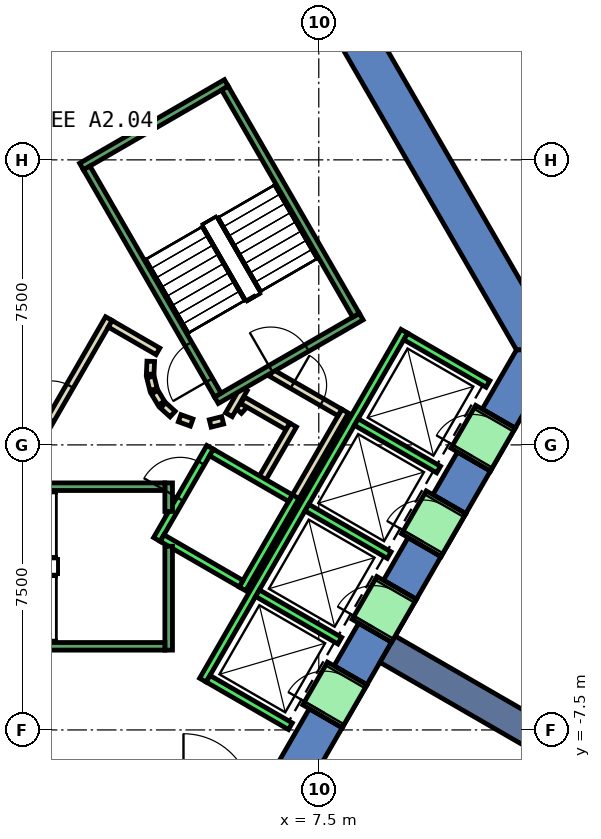
"""IFC4 building model, lengths in metres.
Left out: names, types, materials, properties, quantities, classifications, styles, units other than length and angle.
Written with IfcOpenShell. Run it as: python <this file> out.ifc"""

import sys

from ifc_helpers import new_model, si_unit, direction, frame, frame_2d, origin, place, context, subcontext, project, spatial, polyline, rectangle, outline, extrude, element, fill, save


model = new_model("IFC4")
c1 = context("Model", 3, precision=1e-05, world=origin(), true_north=direction((0.0, 1.0)))
c2 = subcontext(c1, "Body", "Model", "MODEL_VIEW")
j1 = project(units=[si_unit("LENGTHUNIT", "METRE"), si_unit("PLANEANGLEUNIT", "RADIAN")], contexts=[c1])
p1 = place(None, origin())
s1 = spatial("IfcSite", under=j1, at=p1, CompositionType="ELEMENT")
p2 = place(p1, origin())
s2 = spatial("IfcBuilding", under=s1, at=p2, CompositionType="ELEMENT")
p3 = place(p2, origin())
s3 = spatial("IfcBuildingStorey", under=s2, at=p3, CompositionType="ELEMENT", Elevation=0.0)
p4 = place(p3, frame((0.0, 0.0, -0.5)))
e1 = element("IfcWall", 1, at=p4, inside=s3, PredefinedType="SHEAR", context=c2, shape_type="SweptSolid", body=[
    extrude(outline(polyline([(8.517, 11.748), (7.651, 11.248), (12.702, 2.5), (13.856, 2.5), (8.517, 11.748)])), origin(), (0.0, 0.0, 1.0), 9.05),
])
p5 = place(p3, frame((0.0, 0.0, -0.5)))
e2 = element("IfcWall", 2, at=p5, inside=s3, PredefinedType="SHEAR", context=c2, shape_type="SweptSolid", body=[
    extrude(outline(polyline([(8.117, -7.44), (7.252, -6.94), (6.351, -8.5), (6.928, -9.5), (8.117, -7.44)])), origin(), (0.0, 0.0, 1.0), 9.05),
])
p6 = place(p3, frame((0.0, 0.0, -0.5)))
e3 = element("IfcWall", 3, at=p6, inside=s3, PredefinedType="SHEAR", context=c2, shape_type="SweptSolid", body=[
    extrude(outline(polyline([(9.417, -5.189), (8.551, -4.689), (7.902, -5.814), (8.767, -6.314), (9.417, -5.189)])), origin(), (0.0, 0.0, 1.0), 9.05),
])
p7 = place(p3, frame((0.0, 0.0, -0.5)))
e4 = element("IfcWall", 4, at=p7, inside=s3, PredefinedType="SHEAR", context=c2, shape_type="SweptSolid", body=[
    extrude(outline(polyline([(10.717, -2.937), (9.851, -2.437), (9.201, -3.563), (10.067, -4.063), (10.717, -2.937)])), origin(), (0.0, 0.0, 1.0), 9.05),
])
p8 = place(p3, frame((0.0, 0.0, -0.5)))
e5 = element("IfcWall", 5, at=p8, inside=s3, PredefinedType="SHEAR", context=c2, shape_type="SweptSolid", body=[
    extrude(outline(polyline([(12.017, -0.686), (11.151, -0.186), (10.501, -1.311), (11.367, -1.811), (12.017, -0.686)])), origin(), (0.0, 0.0, 1.0), 9.05),
])
p9 = place(p3, frame((0.0, 0.0, -0.5)))
e6 = element("IfcWall", 6, at=p9, inside=s3, PredefinedType="SHEAR", context=c2, shape_type="SweptSolid", body=[
    extrude(outline(polyline([(11.801, 0.94), (12.667, 0.44), (13.856, 2.5), (12.702, 2.5), (11.801, 0.94)])), origin(), (0.0, 0.0, 1.0), 9.05),
])
p10 = place(p3, frame((0.0, 0.0, 3.6)))
e7 = element("IfcWall", 7, at=p10, inside=s3, PredefinedType="SHEAR", context=c2, shape_type="SweptSolid", body=[
    extrude(outline(polyline([(8.767, -6.314), (7.902, -5.814), (7.252, -6.94), (8.117, -7.44), (8.767, -6.314)])), origin(), (0.0, 0.0, 1.0), 4.95),
])
p11 = place(p3, frame((0.0, 0.0, 3.6)))
e8 = element("IfcWall", 8, at=p11, inside=s3, PredefinedType="SHEAR", context=c2, shape_type="SweptSolid", body=[
    extrude(outline(polyline([(10.067, -4.063), (9.201, -3.563), (8.551, -4.689), (9.417, -5.189), (10.067, -4.063)])), origin(), (0.0, 0.0, 1.0), 4.95),
])
p12 = place(p3, frame((0.0, 0.0, 3.6)))
e9 = element("IfcWall", 9, at=p12, inside=s3, PredefinedType="SHEAR", context=c2, shape_type="SweptSolid", body=[
    extrude(outline(polyline([(11.367, -1.811), (10.501, -1.311), (9.851, -2.437), (10.717, -2.937), (11.367, -1.811)])), origin(), (0.0, 0.0, 1.0), 4.95),
])
p13 = place(p3, frame((0.0, 0.0, 3.6)))
e10 = element("IfcWall", 10, at=p13, inside=s3, PredefinedType="SHEAR", context=c2, shape_type="SweptSolid", body=[
    extrude(outline(polyline([(12.667, 0.44), (11.801, 0.94), (11.151, -0.186), (12.017, -0.686), (12.667, 0.44)])), origin(), (0.0, 0.0, 1.0), 4.95),
])
p14 = place(p3, frame((9.31, -5.375, -0.5), z_axis=(0.0, 0.0, 1.0), x_axis=(0.866017533419, -0.500013631625, 0.0)))
e11 = element("IfcWall", 11, at=p14, inside=s3, PredefinedType="SHEAR", context=c2, shape_type="SweptSolid", body=[
    extrude(rectangle(XDim=9.0, YDim=0.8, at=frame_2d((4.5, 0.0))), origin(), (0.0, 0.0, 1.0), 9.05),
])
p15 = place(p3, frame((5.39, 0.898, 0.0), z_axis=(0.0, 0.0, 1.0), x_axis=(0.673828488714, 0.738887791073, 0.0)))
e12 = element("IfcWall", 12, at=p15, inside=s3, PredefinedType="PARTITIONING", context=c2, shape_type="SweptSolid", body=[
    extrude(rectangle(XDim=0.263, YDim=0.2, at=frame_2d((0.131, 0.0))), origin(), (0.0, 0.0, 1.0), 8.55),
])
p16 = place(p3, frame((5.499, 1.172, 0.0), z_axis=(0.0, 0.0, 1.0), x_axis=(0.866333505267, -0.499465972466, 0.0)))
e13 = element("IfcWall", 13, at=p16, inside=s3, PredefinedType="PARTITIONING", context=c2, shape_type="SweptSolid", body=[
    extrude(rectangle(XDim=1.374, YDim=0.2, at=frame_2d((0.687, 0.0))), origin(), (0.0, 0.0, 1.0), 8.55),
])
p17 = place(p3, frame((6.826, 0.522, 0.0), z_axis=(0.0, 0.0, 1.0), x_axis=(-0.500016722714, -0.866015748706, 0.0)))
e14 = element("IfcWall", 14, at=p17, inside=s3, PredefinedType="PARTITIONING", context=c2, shape_type="SweptSolid", body=[
    extrude(rectangle(XDim=1.7, YDim=0.2, at=frame_2d((0.85, 0.0))), origin(), (0.0, 0.0, 1.0), 8.55),
])
p18 = place(p3, frame((8.192, 0.888, 0.0), z_axis=(0.0, 0.0, 1.0), x_axis=(-0.499940625693, -0.866059680843, 0.0)))
e15 = element("IfcWall", 15, at=p18, inside=s3, PredefinedType="PARTITIONING", context=c2, shape_type="SweptSolid", body=[
    extrude(rectangle(XDim=2.68, YDim=0.2, at=frame_2d((1.34, 0.0))), origin(), (0.0, 0.0, 1.0), 8.55),
])
p19 = place(p3, frame((5.135, 0.793, 0.0), z_axis=(0.0, 0.0, 1.0), x_axis=(0.499526442893, 0.866298639529, 0.0)))
e16 = element("IfcWall", 16, at=p19, inside=s3, PredefinedType="PARTITIONING", context=c2, shape_type="SweptSolid", body=[
    extrude(rectangle(XDim=0.791, YDim=0.2, at=frame_2d((0.396, 0.0))), origin(), (0.0, 0.0, 1.0), 8.55),
])
p20 = place(p3, frame((6.25, 1.894, 0.0), z_axis=(0.0, 0.0, 1.0), x_axis=(0.866043184279, -0.499969202016, 0.0)))
e17 = element("IfcWall", 17, at=p20, inside=s3, PredefinedType="PARTITIONING", context=c2, shape_type="SweptSolid", body=[
    extrude(rectangle(XDim=2.084, YDim=0.2, at=frame_2d((1.042, 0.0))), origin(), (0.0, 0.0, 1.0), 8.55),
])
p21 = place(p20, frame((0.642, 0.0, 0.0)))
e18 = element("IfcOpeningElement", 18, at=p21, cuts=e17, PredefinedType="OPENING", context=c2, shape_type="SweptSolid", body=[
    extrude(rectangle(XDim=0.9, YDim=2.1, at=frame_2d((0.45, 1.05))), frame((0.0, 0.11, 0.0), z_axis=(0.0, -1.0, 0.0), x_axis=(1.0, 0.0, 0.0)), (0.0, 0.0, 1.0), 0.22),
])
p22 = place(p3, frame((3.079, 2.199, 0.0), z_axis=(0.0, 0.0, 1.0), x_axis=(-0.047771483479, -0.998858290933, 0.0)))
e19 = element("IfcWall", 19, at=p22, inside=s3, PredefinedType="PARTITIONING", context=c2, shape_type="SweptSolid", body=[
    extrude(rectangle(XDim=0.337, YDim=0.2, at=frame_2d((0.169, 0.0))), origin(), (0.0, 0.0, 1.0), 8.55),
])
p23 = place(p3, frame((3.07, 1.786, 0.0), z_axis=(0.0, 0.0, 1.0), x_axis=(0.242705583207, -0.970099994784, 0.0)))
e20 = element("IfcWall", 20, at=p23, inside=s3, PredefinedType="PARTITIONING", context=c2, shape_type="SweptSolid", body=[
    extrude(rectangle(XDim=0.338, YDim=0.2, at=frame_2d((0.169, 0.0))), origin(), (0.0, 0.0, 1.0), 8.55),
])
for number, where, z_axis, x_axis in (
    (21, (3.182, 1.388, 0.0), (0.0, 0.0, 1.0), (0.512, -0.859, 0.0)),
    (22, (3.404, 1.039, 0.0), (0.0, 0.0, 1.0), (0.74, -0.672, 0.0)),
):
    element("IfcWall", number, at=place(p3, frame(where, z_axis=z_axis, x_axis=x_axis)), inside=s3, PredefinedType="PARTITIONING", context=c2, shape_type="SweptSolid", body=[
        extrude(rectangle(XDim=0.338, YDim=0.2, at=frame_2d((0.169, 0.0))), origin(), (0.0, 0.0, 1.0), 8.55),
    ])
p24 = place(p3, frame((3.838, 0.702, 0.0), z_axis=(0.0, 0.0, 1.0), x_axis=(0.941035081519, -0.338308993895, 0.0)))
e23 = element("IfcWall", 23, at=p24, inside=s3, PredefinedType="PARTITIONING", context=c2, shape_type="SweptSolid", body=[
    extrude(rectangle(XDim=0.337, YDim=0.2, at=frame_2d((0.168, 0.0))), origin(), (0.0, 0.0, 1.0), 8.55),
])
p25 = place(p3, frame((4.644, 0.564, 0.0), z_axis=(0.0, 0.0, 1.0), x_axis=(0.969929076366, 0.243387729394, 0.0)))
e24 = element("IfcWall", 24, at=p25, inside=s3, PredefinedType="PARTITIONING", context=c2, shape_type="SweptSolid", body=[
    extrude(rectangle(XDim=0.337, YDim=0.2, at=frame_2d((0.168, 0.0))), origin(), (0.0, 0.0, 1.0), 8.55),
])
p26 = place(p3, frame((-0.52, -1.0, 0.0), z_axis=(0.0, 0.0, 1.0), x_axis=(0.50011622646, 0.865958290007, 0.0)))
e25 = element("IfcWall", 25, at=p26, inside=s3, PredefinedType="PARTITIONING", context=c2, shape_type="SweptSolid", body=[
    extrude(rectangle(XDim=4.991, YDim=0.2, at=frame_2d((2.496, 0.0))), origin(), (0.0, 0.0, 1.0), 8.55),
])
p27 = place(p26, frame((1.945, 0.0, 0.0)))
e26 = element("IfcOpeningElement", 26, at=p27, cuts=e25, PredefinedType="OPENING", context=c2, shape_type="SweptSolid", body=[
    extrude(rectangle(XDim=1.0, YDim=2.1, at=frame_2d((0.5, 1.05))), frame((0.0, 0.11, 0.0), z_axis=(0.0, -1.0, 0.0), x_axis=(1.0, 0.0, 0.0)), (0.0, 0.0, 1.0), 0.22),
])
p28 = place(p3, frame((2.012, 3.186, 0.0), z_axis=(0.0, 0.0, 1.0), x_axis=(0.865891012941, -0.500232699559, 0.0)))
e27 = element("IfcWall", 27, at=p28, inside=s3, PredefinedType="PARTITIONING", context=c2, shape_type="SweptSolid", body=[
    extrude(rectangle(XDim=1.449, YDim=0.2, at=frame_2d((0.725, 0.0))), origin(), (0.0, 0.0, 1.0), 8.55),
])
p29 = place(p3, frame((3.24, -2.488, 0.0), z_axis=(0.0, 0.0, 1.0), x_axis=(0.49994636267, 0.866056369097, 0.0)))
e28 = element("IfcWall", 28, at=p29, inside=s3, PredefinedType="STANDARD", context=c2, shape_type="SweptSolid", body=[
    extrude(rectangle(XDim=2.8, YDim=0.2, at=frame_2d((1.4, 0.0))), origin(), (0.0, 0.0, 1.0), 8.55),
])
p30 = place(p29, frame((1.225, 0.0, 0.0)))
e29 = element("IfcOpeningElement", 29, at=p30, cuts=e28, PredefinedType="OPENING", context=c2, shape_type="SweptSolid", body=[
    extrude(rectangle(XDim=1.1, YDim=2.1, at=frame_2d((0.55, 1.05))), frame((0.0, 0.11, 0.0), z_axis=(0.0, -1.0, 0.0), x_axis=(1.0, 0.0, 0.0)), (0.0, 0.0, 1.0), 0.22),
])
p31 = place(p3, frame((5.492, -3.788, 0.0), z_axis=(0.0, 0.0, 1.0), x_axis=(0.500011755427, 0.866018616679, 0.0)))
e30 = element("IfcWall", 30, at=p31, inside=s3, PredefinedType="STANDARD", context=c2, shape_type="SweptSolid", body=[
    extrude(rectangle(XDim=2.8, YDim=0.2, at=frame_2d((1.4, 0.0))), origin(), (0.0, 0.0, 1.0), 8.55),
])
p32 = place(p3, frame((3.377, -2.452, 0.0), z_axis=(0.0, 0.0, 1.0), x_axis=(0.865955154139, -0.50012165622, 0.0)))
e31 = element("IfcWall", 31, at=p32, inside=s3, PredefinedType="STANDARD", context=c2, shape_type="SweptSolid", body=[
    extrude(rectangle(XDim=2.4, YDim=0.2, at=frame_2d((1.2, 0.0))), origin(), (0.0, 0.0, 1.0), 8.55),
])
p33 = place(p3, frame((4.677, -0.2, 0.0), z_axis=(0.0, 0.0, 1.0), x_axis=(0.865973769406, -0.500089422704, 0.0)))
e32 = element("IfcWall", 32, at=p33, inside=s3, PredefinedType="STANDARD", context=c2, shape_type="SweptSolid", body=[
    extrude(rectangle(XDim=2.399, YDim=0.2, at=frame_2d((1.2, 0.0))), origin(), (0.0, 0.0, 1.0), 8.55),
])
p34 = place(p3, frame((4.451, -6.19, 0.0), z_axis=(0.0, 0.0, 1.0), x_axis=(0.50000090737, 0.866024879913, 0.0)))
e33 = element("IfcWall", 33, at=p34, inside=s3, PredefinedType="STANDARD", context=c2, shape_type="SweptSolid", body=[
    extrude(rectangle(XDim=10.6, YDim=0.2, at=frame_2d((5.3, 0.0))), origin(), (0.0, 0.0, 1.0), 8.55),
])
for number, where, z_axis, x_axis in (
    (34, (4.588, -6.153, 0.0), (0.0, 0.0, 1.0), (0.866, -0.5, 0.0)),
    (35, (5.888, -3.902, 0.0), (0.0, 0.0, 1.0), (0.866, -0.5, 0.0)),
    (36, (7.188, -1.65, 0.0), (0.0, 0.0, 1.0), (0.866, -0.5, 0.0)),
    (37, (8.488, 0.602, 0.0), (0.0, 0.0, 1.0), (0.866, -0.5, 0.0)),
):
    element("IfcWall", number, at=place(p3, frame(where, z_axis=z_axis, x_axis=x_axis)), inside=s3, PredefinedType="STANDARD", context=c2, shape_type="SweptSolid", body=[
        extrude(rectangle(XDim=2.5, YDim=0.2, at=frame_2d((1.25, 0.0))), origin(), (0.0, 0.0, 1.0), 8.55),
    ])
p35 = place(p3, frame((9.788, 2.853, 0.0), z_axis=(0.0, 0.0, 1.0), x_axis=(0.865998541277, -0.500046524342, 0.0)))
e38 = element("IfcWall", 38, at=p35, inside=s3, PredefinedType="STANDARD", context=c2, shape_type="SweptSolid", body=[
    extrude(rectangle(XDim=2.5, YDim=0.2, at=frame_2d((1.25, 0.0))), origin(), (0.0, 0.0, 1.0), 8.55),
])
p36 = place(p3, frame((7.598, -7.14, 0.0), z_axis=(0.0, 0.0, 1.0), x_axis=(0.500362116554, 0.865816234728, 0.0)))
e39 = element("IfcWall", 39, at=p36, inside=s3, PredefinedType="STANDARD", context=c2, shape_type="SweptSolid", body=[
    extrude(rectangle(XDim=1.299, YDim=1.2, at=frame_2d((0.65, 0.0))), origin(), (0.0, 0.0, 1.0), 2.4),
])
p37 = place(p36, frame((0.1, 0.0, 0.0)))
e40 = element("IfcOpeningElement", 40, at=p37, cuts=e39, PredefinedType="OPENING", context=c2, shape_type="SweptSolid", body=[
    extrude(rectangle(XDim=1.1, YDim=2.3, at=frame_2d((0.55, 1.15))), frame((0.0, 0.61, 0.0), z_axis=(0.0, -1.0, 0.0), x_axis=(1.0, 0.0, 0.0)), (0.0, 0.0, 1.0), 1.22),
])
p38 = place(p3, frame((8.898, -4.889, 0.0), z_axis=(0.0, 0.0, 1.0), x_axis=(0.500036693733, 0.866004217611, 0.0)))
e41 = element("IfcWall", 41, at=p38, inside=s3, PredefinedType="STANDARD", context=c2, shape_type="SweptSolid", body=[
    extrude(rectangle(XDim=1.3, YDim=1.2, at=frame_2d((0.65, 0.0))), origin(), (0.0, 0.0, 1.0), 2.4),
])
p39 = place(p38, frame((0.1, 0.0, 0.0)))
e42 = element("IfcOpeningElement", 42, at=p39, cuts=e41, PredefinedType="OPENING", context=c2, shape_type="SweptSolid", body=[
    extrude(rectangle(XDim=1.1, YDim=2.3, at=frame_2d((0.55, 1.15))), frame((0.0, 0.61, 0.0), z_axis=(0.0, -1.0, 0.0), x_axis=(1.0, 0.0, 0.0)), (0.0, 0.0, 1.0), 1.22),
])
p40 = place(p3, frame((10.198, -2.637, 0.0), z_axis=(0.0, 0.0, 1.0), x_axis=(0.49989585183, 0.866085525409, 0.0)))
e43 = element("IfcWall", 43, at=p40, inside=s3, PredefinedType="STANDARD", context=c2, shape_type="SweptSolid", body=[
    extrude(rectangle(XDim=1.3, YDim=1.2, at=frame_2d((0.65, 0.0))), origin(), (0.0, 0.0, 1.0), 2.4),
])
p41 = place(p40, frame((0.1, 0.0, 0.0)))
e44 = element("IfcOpeningElement", 44, at=p41, cuts=e43, PredefinedType="OPENING", context=c2, shape_type="SweptSolid", body=[
    extrude(rectangle(XDim=1.1, YDim=2.3, at=frame_2d((0.55, 1.15))), frame((0.0, 0.61, 0.0), z_axis=(0.0, -1.0, 0.0), x_axis=(1.0, 0.0, 0.0)), (0.0, 0.0, 1.0), 1.22),
])
p42 = place(p3, frame((11.498, -0.385, 0.0), z_axis=(0.0, 0.0, 1.0), x_axis=(0.500221244143, 0.865897630733, 0.0)))
e45 = element("IfcWall", 45, at=p42, inside=s3, PredefinedType="STANDARD", context=c2, shape_type="SweptSolid", body=[
    extrude(rectangle(XDim=1.299, YDim=1.2, at=frame_2d((0.65, 0.0))), origin(), (0.0, 0.0, 1.0), 2.4),
])
p43 = place(p42, frame((0.1, 0.0, 0.0)))
e46 = element("IfcOpeningElement", 46, at=p43, cuts=e45, PredefinedType="OPENING", context=c2, shape_type="SweptSolid", body=[
    extrude(rectangle(XDim=1.1, YDim=2.3, at=frame_2d((0.55, 1.15))), frame((0.0, 0.61, 0.0), z_axis=(0.0, -1.0, 0.0), x_axis=(1.0, 0.0, 0.0)), (0.0, 0.0, 1.0), 1.22),
])
p44 = place(p3, frame((3.55, -2.667, 0.0), z_axis=(0.0, 0.0, 1.0), x_axis=(0.0, -1.0, 0.0)))
e47 = element("IfcWall", 47, at=p44, inside=s3, PredefinedType="STANDARD", context=c2, shape_type="SweptSolid", body=[
    extrude(rectangle(XDim=2.733, YDim=0.2, at=frame_2d((1.366, 0.0))), origin(), (0.0, 0.0, 1.0), 8.55),
])
p45 = place(p3, frame((3.55, -1.0, 0.0), z_axis=(0.0, 0.0, 1.0), x_axis=(0.0, -1.0, 0.0)))
e48 = element("IfcWall", 48, at=p45, inside=s3, PredefinedType="STANDARD", context=c2, shape_type="SweptSolid", body=[
    extrude(rectangle(XDim=0.751, YDim=0.2, at=frame_2d((0.375, 0.0))), origin(), (0.0, 0.0, 1.0), 8.55),
])
p46 = place(p3, frame((-3.45, -1.1, 0.0), z_axis=(0.0, 0.0, 1.0), x_axis=(1.0, 0.0, 0.0)))
e49 = element("IfcWall", 49, at=p46, inside=s3, PredefinedType="STANDARD", context=c2, shape_type="SweptSolid", body=[
    extrude(rectangle(XDim=6.9, YDim=0.2, at=frame_2d((3.45, 0.0))), origin(), (0.0, 0.0, 1.0), 8.55),
])
p47 = place(p46, frame((0.45, 0.0, 0.0)))
e50 = element("IfcOpeningElement", 50, at=p47, cuts=e49, PredefinedType="OPENING", context=c2, shape_type="SweptSolid", body=[
    extrude(rectangle(XDim=1.1, YDim=2.2, at=frame_2d((0.55, 1.1))), frame((0.0, 0.11, 0.0), z_axis=(0.0, -1.0, 0.0), x_axis=(1.0, 0.0, 0.0)), (0.0, 0.0, 1.0), 0.22),
])
p48 = place(p3, frame((-3.45, -5.3, 0.0), z_axis=(0.0, 0.0, 1.0), x_axis=(1.0, 0.0, 0.0)))
e51 = element("IfcWall", 51, at=p48, inside=s3, PredefinedType="STANDARD", context=c2, shape_type="SweptSolid", body=[
    extrude(rectangle(XDim=6.9, YDim=0.2, at=frame_2d((3.45, 0.0))), origin(), (0.0, 0.0, 1.0), 8.55),
])
p49 = place(p3, frame((4.806, 1.176, 0.0), z_axis=(0.0, 0.0, 1.0), x_axis=(0.866059941101, 0.499940174841, 0.0)))
e52 = element("IfcWall", 52, at=p49, inside=s3, PredefinedType="STANDARD", context=c2, shape_type="SweptSolid", body=[
    extrude(rectangle(XDim=4.4, YDim=0.2, at=frame_2d((2.2, 0.0))), origin(), (0.0, 0.0, 1.0), 8.55),
])
p50 = place(p49, frame((1.65, 0.0, 0.0)))
e53 = element("IfcOpeningElement", 53, at=p50, cuts=e52, PredefinedType="OPENING", context=c2, shape_type="SweptSolid", body=[
    extrude(rectangle(XDim=1.1, YDim=2.2, at=frame_2d((0.55, 1.1))), frame((0.0, 0.11, 0.0), z_axis=(0.0, -1.0, 0.0), x_axis=(1.0, 0.0, 0.0)), (0.0, 0.0, 1.0), 0.22),
])
p51 = place(p3, frame((1.256, 7.324, 0.0), z_axis=(0.0, 0.0, 1.0), x_axis=(0.866046073146, 0.499964197906, 0.0)))
e54 = element("IfcWall", 54, at=p51, inside=s3, PredefinedType="STANDARD", context=c2, shape_type="SweptSolid", body=[
    extrude(rectangle(XDim=4.4, YDim=0.2, at=frame_2d((2.2, 0.0))), origin(), (0.0, 0.0, 1.0), 8.55),
])
p52 = place(p3, frame((4.843, 1.312, 0.0), z_axis=(0.0, 0.0, 1.0), x_axis=(-0.499963383562, 0.866046543262, 0.0)))
e55 = element("IfcWall", 55, at=p52, inside=s3, PredefinedType="STANDARD", context=c2, shape_type="SweptSolid", body=[
    extrude(rectangle(XDim=6.9, YDim=0.2, at=frame_2d((3.45, 0.0))), origin(), (0.0, 0.0, 1.0), 8.55),
])
p53 = place(p52, frame((0.45, 0.0, 0.0)))
e56 = element("IfcOpeningElement", 56, at=p53, cuts=e55, PredefinedType="OPENING", context=c2, shape_type="SweptSolid", body=[
    extrude(rectangle(XDim=1.1, YDim=2.2, at=frame_2d((0.55, 1.1))), frame((0.0, 0.11, 0.0), z_axis=(0.0, -1.0, 0.0), x_axis=(1.0, 0.0, 0.0)), (0.0, 0.0, 1.0), 0.22),
])
p54 = place(p3, frame((8.48, 3.412, 0.0), z_axis=(0.0, 0.0, 1.0), x_axis=(-0.499978703459, 0.866037698999, 0.0)))
e57 = element("IfcWall", 57, at=p54, inside=s3, PredefinedType="STANDARD", context=c2, shape_type="SweptSolid", body=[
    extrude(rectangle(XDim=6.9, YDim=0.2, at=frame_2d((3.45, 0.0))), origin(), (0.0, 0.0, 1.0), 8.55),
])
p55 = place(p27, origin())
e58 = element("IfcDoor", 58, at=p55, inside=s3, OperationType="SINGLE_SWING_LEFT", PredefinedType="DOOR", context=c2, shape_type="SweptSolid", body=[
    extrude(rectangle(XDim=1.0, YDim=2.1, at=frame_2d((0.5, 1.05))), frame((0.0, 0.025, 0.0), z_axis=(0.0, -1.0, 0.0), x_axis=(1.0, 0.0, 0.0)), (0.0, 0.0, 1.0), 0.05),
])
fill(e26, e58)
p56 = place(p21, origin())
e59 = element("IfcDoor", 59, at=p56, inside=s3, OperationType="SINGLE_SWING_LEFT", PredefinedType="DOOR", context=c2, shape_type="SweptSolid", body=[
    extrude(rectangle(XDim=0.9, YDim=2.1, at=frame_2d((0.45, 1.05))), frame((0.0, 0.025, 0.0), z_axis=(0.0, -1.0, 0.0), x_axis=(1.0, 0.0, 0.0)), (0.0, 0.0, 1.0), 0.05),
])
fill(e18, e59)
p57 = place(p37, origin())
e60 = element("IfcDoor", 60, at=p57, inside=s3, OperationType="SLIDING_TO_LEFT", PredefinedType="DOOR", context=c2, shape_type="SweptSolid", body=[
    extrude(rectangle(XDim=1.1, YDim=2.3, at=frame_2d((0.55, 1.15))), frame((0.0, 0.025, 0.0), z_axis=(0.0, -1.0, 0.0), x_axis=(1.0, 0.0, 0.0)), (0.0, 0.0, 1.0), 0.05),
])
fill(e40, e60)
p58 = place(p39, origin())
e61 = element("IfcDoor", 61, at=p58, inside=s3, OperationType="SLIDING_TO_LEFT", PredefinedType="DOOR", context=c2, shape_type="SweptSolid", body=[
    extrude(rectangle(XDim=1.1, YDim=2.3, at=frame_2d((0.55, 1.15))), frame((0.0, 0.025, 0.0), z_axis=(0.0, -1.0, 0.0), x_axis=(1.0, 0.0, 0.0)), (0.0, 0.0, 1.0), 0.05),
])
fill(e42, e61)
p59 = place(p41, origin())
e62 = element("IfcDoor", 62, at=p59, inside=s3, OperationType="SLIDING_TO_LEFT", PredefinedType="DOOR", context=c2, shape_type="SweptSolid", body=[
    extrude(rectangle(XDim=1.1, YDim=2.3, at=frame_2d((0.55, 1.15))), frame((0.0, 0.025, 0.0), z_axis=(0.0, -1.0, 0.0), x_axis=(1.0, 0.0, 0.0)), (0.0, 0.0, 1.0), 0.05),
])
fill(e44, e62)
p60 = place(p43, origin())
e63 = element("IfcDoor", 63, at=p60, inside=s3, OperationType="SLIDING_TO_LEFT", PredefinedType="DOOR", context=c2, shape_type="SweptSolid", body=[
    extrude(rectangle(XDim=1.1, YDim=2.3, at=frame_2d((0.55, 1.15))), frame((0.0, 0.025, 0.0), z_axis=(0.0, -1.0, 0.0), x_axis=(1.0, 0.0, 0.0)), (0.0, 0.0, 1.0), 0.05),
])
fill(e46, e63)
p61 = place(p30, origin())
e64 = element("IfcDoor", 64, at=p61, inside=s3, OperationType="SLIDING_TO_LEFT", PredefinedType="DOOR", context=c2, shape_type="SweptSolid", body=[
    extrude(rectangle(XDim=1.1, YDim=2.1, at=frame_2d((0.55, 1.05))), frame((0.0, 0.025, 0.0), z_axis=(0.0, -1.0, 0.0), x_axis=(1.0, 0.0, 0.0)), (0.0, 0.0, 1.0), 0.05),
])
fill(e29, e64)
p62 = place(p53, origin())
e65 = element("IfcDoor", 65, at=p62, inside=s3, OperationType="SINGLE_SWING_LEFT", PredefinedType="DOOR", context=c2, shape_type="SweptSolid", body=[
    extrude(rectangle(XDim=1.1, YDim=2.2, at=frame_2d((0.55, 1.1))), frame((0.0, 0.025, 0.0), z_axis=(0.0, -1.0, 0.0), x_axis=(1.0, 0.0, 0.0)), (0.0, 0.0, 1.0), 0.05),
])
fill(e56, e65)
p63 = place(p50, origin())
e66 = element("IfcDoor", 66, at=p63, inside=s3, OperationType="SINGLE_SWING_LEFT", PredefinedType="DOOR", context=c2, shape_type="SweptSolid", body=[
    extrude(rectangle(XDim=1.1, YDim=2.2, at=frame_2d((0.55, 1.1))), frame((0.0, 0.025, 0.0), z_axis=(0.0, -1.0, 0.0), x_axis=(1.0, 0.0, 0.0)), (0.0, 0.0, 1.0), 0.05),
])
fill(e53, e66)
save(model, sys.argv[1])
